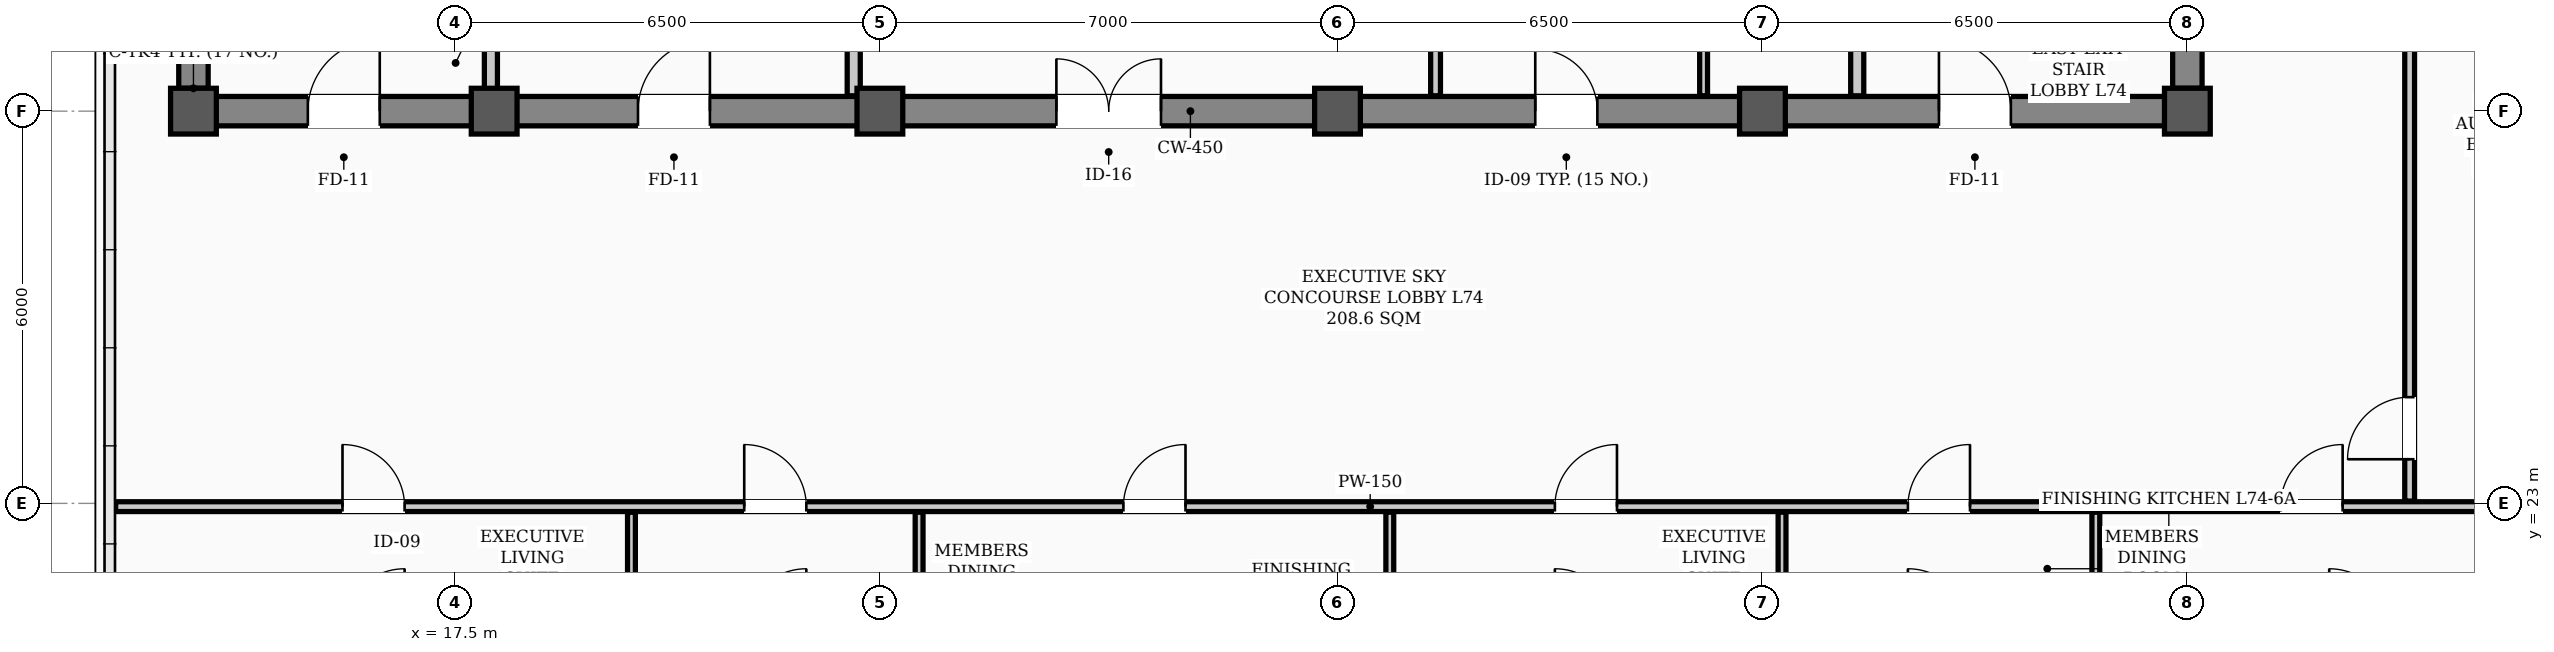
"""IFC4 building model, lengths in metres.
Left out: names, types, materials, properties, quantities, classifications, styles, units other than length and angle.
Written with IfcOpenShell. Run it as: python <this file> out.ifc"""

import sys

from ifc_helpers import new_model, si_unit, direction, frame, frame_2d, origin, origin_2d, place, context, subcontext, project, spatial, rectangle, hollow_rectangle, extrude, element, fill, save


model = new_model("IFC4")
c1 = context("Model", 3, precision=1e-05, world=origin(), true_north=direction((0.0, 1.0)))
c2 = subcontext(c1, "Body", "Model", "MODEL_VIEW")
j1 = project(units=[si_unit("LENGTHUNIT", "METRE"), si_unit("PLANEANGLEUNIT", "RADIAN")], contexts=[c1])
p1 = place(None, origin())
s1 = spatial("IfcSite", under=j1, at=p1, CompositionType="ELEMENT")
p2 = place(p1, origin())
s2 = spatial("IfcBuilding", under=s1, at=p2, CompositionType="ELEMENT")
p3 = place(p2, frame((0.0, 0.0, 296.9)))
s3 = spatial("IfcBuildingStorey", under=s2, at=p3, CompositionType="ELEMENT", Elevation=296.9)
for number, where, z_axis, x_axis in (
    (1, (13.5, 29.0, 0.0), (0.0, 0.0, 1.0), (1.0, 0.0, 0.0)),
    (2, (18.1, 29.0, 0.0), (0.0, 0.0, 1.0), (1.0, 0.0, 0.0)),
    (3, (24.0, 29.0, 0.0), (0.0, 0.0, 1.0), (1.0, 0.0, 0.0)),
    (4, (31.0, 29.0, 0.0), (0.0, 0.0, 1.0), (1.0, 0.0, 0.0)),
    (5, (37.5, 29.0, 0.0), (0.0, 0.0, 1.0), (1.0, 0.0, 0.0)),
    (6, (44.0, 29.0, 0.0), (0.0, 0.0, 1.0), (1.0, 0.0, 0.0)),
):
    element("IfcColumn", number, at=place(p3, frame(where, z_axis=z_axis, x_axis=x_axis)), inside=s3, PredefinedType="COLUMN", context=c2, shape_type="SweptSolid", body=[
        extrude(hollow_rectangle(XDim=0.7, YDim=0.7, WallThickness=0.028, InnerFilletRadius=0.014, OuterFilletRadius=0.042, at=origin_2d()), origin(), (0.0, 0.0, 1.0), 3.9),
    ])
p4 = place(p3, frame((13.5, 29.0, 0.0), z_axis=(0.0, 0.0, 1.0), x_axis=(1.0, 0.0, 0.0)))
e7 = element("IfcWall", 7, at=p4, inside=s3, PredefinedType="SHEAR", context=c2, shape_type="SweptSolid", body=[
    extrude(rectangle(XDim=30.5, YDim=0.45, at=frame_2d((15.25, 0.0))), origin(), (0.0, 0.0, 1.0), 3.72),
])
p5 = place(p4, frame((1.75, 0.0, 0.0)))
e8 = element("IfcOpeningElement", 8, at=p5, cuts=e7, PredefinedType="OPENING", context=c2, shape_type="SweptSolid", body=[
    extrude(rectangle(XDim=1.1, YDim=2.08, at=frame_2d((0.55, 1.04))), frame((0.0, 0.235, 0.0), z_axis=(0.0, -1.0, 0.0), x_axis=(1.0, 0.0, 0.0)), (0.0, 0.0, 1.0), 0.47),
])
p6 = place(p4, frame((26.7, 0.0, 0.0)))
e9 = element("IfcOpeningElement", 9, at=p6, cuts=e7, PredefinedType="OPENING", context=c2, shape_type="SweptSolid", body=[
    extrude(rectangle(XDim=1.1, YDim=2.08, at=frame_2d((0.55, 1.04))), frame((0.0, 0.235, 0.0), z_axis=(0.0, -1.0, 0.0), x_axis=(1.0, 0.0, 0.0)), (0.0, 0.0, 1.0), 0.47),
])
p7 = place(p4, frame((6.8, 0.0, 0.0)))
e10 = element("IfcOpeningElement", 10, at=p7, cuts=e7, PredefinedType="OPENING", context=c2, shape_type="SweptSolid", body=[
    extrude(rectangle(XDim=1.1, YDim=2.08, at=frame_2d((0.55, 1.04))), frame((0.0, 0.235, 0.0), z_axis=(0.0, -1.0, 0.0), x_axis=(1.0, 0.0, 0.0)), (0.0, 0.0, 1.0), 0.47),
])
p8 = place(p4, frame((13.2, 0.0, 0.0)))
e11 = element("IfcOpeningElement", 11, at=p8, cuts=e7, PredefinedType="OPENING", context=c2, shape_type="SweptSolid", body=[
    extrude(rectangle(XDim=1.6, YDim=2.08, at=frame_2d((0.8, 1.04))), frame((0.0, 0.235, 0.0), z_axis=(0.0, -1.0, 0.0), x_axis=(1.0, 0.0, 0.0)), (0.0, 0.0, 1.0), 0.47),
])
p9 = place(p4, frame((20.525, 0.0, 0.0)))
e12 = element("IfcOpeningElement", 12, at=p9, cuts=e7, PredefinedType="OPENING", context=c2, shape_type="SweptSolid", body=[
    extrude(rectangle(XDim=0.95, YDim=2.08, at=frame_2d((0.475, 1.04))), frame((0.0, 0.235, 0.0), z_axis=(0.0, -1.0, 0.0), x_axis=(1.0, 0.0, 0.0)), (0.0, 0.0, 1.0), 0.47),
])
for number, where, z_axis, x_axis in (
    (13, (13.5, 29.35, 0.0), (0.0, 0.0, 1.0), (0.0, 1.0, 0.0)),
    (14, (44.0, 29.35, 0.0), (0.0, 0.0, 1.0), (0.0, 1.0, 0.0)),
):
    element("IfcWall", number, at=place(p3, frame(where, z_axis=z_axis, x_axis=x_axis)), inside=s3, PredefinedType="SHEAR", context=c2, shape_type="SweptSolid", body=[
        extrude(rectangle(XDim=8.6, YDim=0.45, at=frame_2d((4.3, 0.0))), origin(), (0.0, 0.0, 1.0), 3.72),
    ])
p10 = place(p3, frame((12.31, 22.95, 0.0), z_axis=(0.0, 0.0, 1.0), x_axis=(1.0, 0.0, 0.0)))
e15 = element("IfcWall", 15, at=p10, inside=s3, PredefinedType="PARTITIONING", context=c2, shape_type="SweptSolid", body=[
    extrude(rectangle(XDim=38.38, YDim=0.15, at=frame_2d((19.19, 0.0))), origin(), (0.0, 0.0, 1.0), 3.2),
])
p11 = place(p10, frame((3.47, 0.0, 0.0)))
e16 = element("IfcOpeningElement", 16, at=p11, cuts=e15, PredefinedType="OPENING", context=c2, shape_type="SweptSolid", body=[
    extrude(rectangle(XDim=0.95, YDim=2.08, at=frame_2d((0.475, 1.04))), frame((0.0, 0.085, 0.0), z_axis=(0.0, -1.0, 0.0), x_axis=(1.0, 0.0, 0.0)), (0.0, 0.0, 1.0), 0.17),
])
p12 = place(p10, frame((9.615, 0.0, 0.0)))
e17 = element("IfcOpeningElement", 17, at=p12, cuts=e15, PredefinedType="OPENING", context=c2, shape_type="SweptSolid", body=[
    extrude(rectangle(XDim=0.95, YDim=2.08, at=frame_2d((0.475, 1.04))), frame((0.0, 0.085, 0.0), z_axis=(0.0, -1.0, 0.0), x_axis=(1.0, 0.0, 0.0)), (0.0, 0.0, 1.0), 0.17),
])
p13 = place(p10, frame((15.415, 0.0, 0.0)))
e18 = element("IfcOpeningElement", 18, at=p13, cuts=e15, PredefinedType="OPENING", context=c2, shape_type="SweptSolid", body=[
    extrude(rectangle(XDim=0.95, YDim=2.08, at=frame_2d((0.475, 1.04))), frame((0.0, 0.085, 0.0), z_axis=(0.0, -1.0, 0.0), x_axis=(1.0, 0.0, 0.0)), (0.0, 0.0, 1.0), 0.17),
])
p14 = place(p10, frame((22.015, 0.0, 0.0)))
e19 = element("IfcOpeningElement", 19, at=p14, cuts=e15, PredefinedType="OPENING", context=c2, shape_type="SweptSolid", body=[
    extrude(rectangle(XDim=0.95, YDim=2.08, at=frame_2d((0.475, 1.04))), frame((0.0, 0.085, 0.0), z_axis=(0.0, -1.0, 0.0), x_axis=(1.0, 0.0, 0.0)), (0.0, 0.0, 1.0), 0.17),
])
p15 = place(p10, frame((27.415, 0.0, 0.0)))
e20 = element("IfcOpeningElement", 20, at=p15, cuts=e15, PredefinedType="OPENING", context=c2, shape_type="SweptSolid", body=[
    extrude(rectangle(XDim=0.95, YDim=2.08, at=frame_2d((0.475, 1.04))), frame((0.0, 0.085, 0.0), z_axis=(0.0, -1.0, 0.0), x_axis=(1.0, 0.0, 0.0)), (0.0, 0.0, 1.0), 0.17),
])
p16 = place(p10, frame((33.115, 0.0, 0.0)))
e21 = element("IfcOpeningElement", 21, at=p16, cuts=e15, PredefinedType="OPENING", context=c2, shape_type="SweptSolid", body=[
    extrude(rectangle(XDim=0.95, YDim=2.08, at=frame_2d((0.475, 1.04))), frame((0.0, 0.085, 0.0), z_axis=(0.0, -1.0, 0.0), x_axis=(1.0, 0.0, 0.0)), (0.0, 0.0, 1.0), 0.17),
])
p17 = place(p3, frame((18.05, 29.235, 0.0), z_axis=(0.0, 0.0, 1.0), x_axis=(0.0, 1.0, 0.0)))
e22 = element("IfcWall", 22, at=p17, inside=s3, PredefinedType="STANDARD", context=c2, shape_type="SweptSolid", body=[
    extrude(rectangle(XDim=1.065, YDim=0.2, at=frame_2d((0.532, 0.0))), origin(), (0.0, 0.0, 1.0), 3.72),
])
p18 = place(p3, frame((38.95, 29.235, 0.0), z_axis=(0.0, 0.0, 1.0), x_axis=(0.0, 1.0, 0.0)))
e23 = element("IfcWall", 23, at=p18, inside=s3, PredefinedType="STANDARD", context=c2, shape_type="SweptSolid", body=[
    extrude(rectangle(XDim=1.065, YDim=0.2, at=frame_2d((0.532, 0.0))), origin(), (0.0, 0.0, 1.0), 3.4),
])
p19 = place(p3, frame((23.6, 29.235, 0.0), z_axis=(0.0, 0.0, 1.0), x_axis=(0.0, 1.0, 0.0)))
e24 = element("IfcWall", 24, at=p19, inside=s3, PredefinedType="STANDARD", context=c2, shape_type="SweptSolid", body=[
    extrude(rectangle(XDim=5.465, YDim=0.2, at=frame_2d((2.732, 0.0))), origin(), (0.0, 0.0, 1.0), 3.2),
])
p20 = place(p3, frame((32.5, 29.235, 0.0), z_axis=(0.0, 0.0, 1.0), x_axis=(0.0, 1.0, 0.0)))
e25 = element("IfcWall", 25, at=p20, inside=s3, PredefinedType="PARTITIONING", context=c2, shape_type="SweptSolid", body=[
    extrude(rectangle(XDim=2.53, YDim=0.15, at=frame_2d((1.265, 0.0))), origin(), (0.0, 0.0, 1.0), 3.4),
])
p21 = place(p3, frame((36.6, 29.235, 0.0), z_axis=(0.0, 0.0, 1.0), x_axis=(0.0, 1.0, 0.0)))
e26 = element("IfcWall", 26, at=p21, inside=s3, PredefinedType="PARTITIONING", context=c2, shape_type="SweptSolid", body=[
    extrude(rectangle(XDim=2.53, YDim=0.12, at=frame_2d((1.265, 0.0))), origin(), (0.0, 0.0, 1.0), 3.4),
])
p22 = place(p3, frame((47.4, 23.035, 0.0), z_axis=(0.0, 0.0, 1.0), x_axis=(0.0, 1.0, 0.0)))
e27 = element("IfcWall", 27, at=p22, inside=s3, PredefinedType="PARTITIONING", context=c2, shape_type="SweptSolid", body=[
    extrude(rectangle(XDim=18.63, YDim=0.15, at=frame_2d((9.315, 0.0))), origin(), (0.0, 0.0, 1.0), 3.1),
])
p23 = place(p22, frame((0.64, 0.0, 0.0)))
e28 = element("IfcOpeningElement", 28, at=p23, cuts=e27, PredefinedType="OPENING", context=c2, shape_type="SweptSolid", body=[
    extrude(rectangle(XDim=0.95, YDim=2.08, at=frame_2d((0.475, 1.04))), frame((0.0, 0.085, 0.0), z_axis=(0.0, -1.0, 0.0), x_axis=(1.0, 0.0, 0.0)), (0.0, 0.0, 1.0), 0.17),
])
p24 = place(p22, frame((10.59, 0.0, 0.0)))
e29 = element("IfcOpeningElement", 29, at=p24, cuts=e27, PredefinedType="OPENING", context=c2, shape_type="SweptSolid", body=[
    extrude(rectangle(XDim=0.95, YDim=2.08, at=frame_2d((0.475, 1.04))), frame((0.0, 0.085, 0.0), z_axis=(0.0, -1.0, 0.0), x_axis=(1.0, 0.0, 0.0)), (0.0, 0.0, 1.0), 0.17),
])
p25 = place(p22, frame((15.365, 0.0, 0.0)))
e30 = element("IfcOpeningElement", 30, at=p25, cuts=e27, PredefinedType="OPENING", context=c2, shape_type="SweptSolid", body=[
    extrude(rectangle(XDim=0.95, YDim=2.08, at=frame_2d((0.475, 1.04))), frame((0.0, 0.085, 0.0), z_axis=(0.0, -1.0, 0.0), x_axis=(1.0, 0.0, 0.0)), (0.0, 0.0, 1.0), 0.17),
])
p26 = place(p3, frame((20.2, 18.71, 0.0), z_axis=(0.0, 0.0, 1.0), x_axis=(0.0, 1.0, 0.0)))
e31 = element("IfcWall", 31, at=p26, inside=s3, PredefinedType="PARTITIONING", context=c2, shape_type="SweptSolid", body=[
    extrude(rectangle(XDim=4.155, YDim=0.12, at=frame_2d((2.078, 0.0))), origin(), (0.0, 0.0, 1.0), 3.72),
])
p27 = place(p3, frame((24.6, 20.47, 0.0), z_axis=(0.0, 0.0, 1.0), x_axis=(0.0, 1.0, 0.0)))
e32 = element("IfcWall", 32, at=p27, inside=s3, PredefinedType="PARTITIONING", context=c2, shape_type="SweptSolid", body=[
    extrude(rectangle(XDim=2.395, YDim=0.12, at=frame_2d((1.198, 0.0))), origin(), (0.0, 0.0, 1.0), 3.1),
])
for number, where, z_axis, x_axis in (
    (33, (31.8, 18.71, 0.0), (0.0, 0.0, 1.0), (0.0, 1.0, 0.0)),
    (34, (37.8, 18.71, 0.0), (0.0, 0.0, 1.0), (0.0, 1.0, 0.0)),
    (35, (42.6, 18.71, 0.0), (0.0, 0.0, 1.0), (0.0, 1.0, 0.0)),
):
    element("IfcWall", number, at=place(p3, frame(where, z_axis=z_axis, x_axis=x_axis)), inside=s3, PredefinedType="PARTITIONING", context=c2, shape_type="SweptSolid", body=[
        extrude(rectangle(XDim=4.155, YDim=0.12, at=frame_2d((2.078, 0.0))), origin(), (0.0, 0.0, 1.0), 3.1),
    ])
p28 = place(p5, origin())
e36 = element("IfcDoor", 36, at=p28, inside=s3, OperationType="SINGLE_SWING_RIGHT", PredefinedType="DOOR", context=c2, shape_type="SweptSolid", body=[
    extrude(rectangle(XDim=1.1, YDim=2.08, at=frame_2d((0.55, 1.04))), frame((0.0, 0.025, 0.0), z_axis=(0.0, -1.0, 0.0), x_axis=(1.0, 0.0, 0.0)), (0.0, 0.0, 1.0), 0.05),
])
fill(e8, e36)
p29 = place(p6, origin())
e37 = element("IfcDoor", 37, at=p29, inside=s3, OperationType="SINGLE_SWING_LEFT", PredefinedType="DOOR", context=c2, shape_type="SweptSolid", body=[
    extrude(rectangle(XDim=1.1, YDim=2.08, at=frame_2d((0.55, 1.04))), frame((0.0, 0.025, 0.0), z_axis=(0.0, -1.0, 0.0), x_axis=(1.0, 0.0, 0.0)), (0.0, 0.0, 1.0), 0.05),
])
fill(e9, e37)
p30 = place(p7, origin())
e38 = element("IfcDoor", 38, at=p30, inside=s3, OperationType="SINGLE_SWING_RIGHT", PredefinedType="DOOR", context=c2, shape_type="SweptSolid", body=[
    extrude(rectangle(XDim=1.1, YDim=2.08, at=frame_2d((0.55, 1.04))), frame((0.0, 0.025, 0.0), z_axis=(0.0, -1.0, 0.0), x_axis=(1.0, 0.0, 0.0)), (0.0, 0.0, 1.0), 0.05),
])
fill(e10, e38)
p31 = place(p8, origin())
e39 = element("IfcDoor", 39, at=p31, inside=s3, OperationType="DOUBLE_DOOR_SINGLE_SWING", PredefinedType="DOOR", context=c2, shape_type="SweptSolid", body=[
    extrude(rectangle(XDim=1.6, YDim=2.08, at=frame_2d((0.8, 1.04))), frame((0.0, 0.025, 0.0), z_axis=(0.0, -1.0, 0.0), x_axis=(1.0, 0.0, 0.0)), (0.0, 0.0, 1.0), 0.05),
])
fill(e11, e39)
p32 = place(p9, origin())
e40 = element("IfcDoor", 40, at=p32, inside=s3, OperationType="SINGLE_SWING_LEFT", PredefinedType="DOOR", context=c2, shape_type="SweptSolid", body=[
    extrude(rectangle(XDim=0.95, YDim=2.08, at=frame_2d((0.475, 1.04))), frame((0.0, 0.025, 0.0), z_axis=(0.0, -1.0, 0.0), x_axis=(1.0, 0.0, 0.0)), (0.0, 0.0, 1.0), 0.05),
])
fill(e12, e40)
p33 = place(p11, origin())
e41 = element("IfcDoor", 41, at=p33, inside=s3, OperationType="SINGLE_SWING_LEFT", PredefinedType="DOOR", context=c2, shape_type="SweptSolid", body=[
    extrude(rectangle(XDim=0.95, YDim=2.08, at=frame_2d((0.475, 1.04))), frame((0.0, 0.025, 0.0), z_axis=(0.0, -1.0, 0.0), x_axis=(1.0, 0.0, 0.0)), (0.0, 0.0, 1.0), 0.05),
])
fill(e16, e41)
p34 = place(p12, origin())
e42 = element("IfcDoor", 42, at=p34, inside=s3, OperationType="SINGLE_SWING_LEFT", PredefinedType="DOOR", context=c2, shape_type="SweptSolid", body=[
    extrude(rectangle(XDim=0.95, YDim=2.08, at=frame_2d((0.475, 1.04))), frame((0.0, 0.025, 0.0), z_axis=(0.0, -1.0, 0.0), x_axis=(1.0, 0.0, 0.0)), (0.0, 0.0, 1.0), 0.05),
])
fill(e17, e42)
p35 = place(p13, origin())
e43 = element("IfcDoor", 43, at=p35, inside=s3, OperationType="SINGLE_SWING_RIGHT", PredefinedType="DOOR", context=c2, shape_type="SweptSolid", body=[
    extrude(rectangle(XDim=0.95, YDim=2.08, at=frame_2d((0.475, 1.04))), frame((0.0, 0.025, 0.0), z_axis=(0.0, -1.0, 0.0), x_axis=(1.0, 0.0, 0.0)), (0.0, 0.0, 1.0), 0.05),
])
fill(e18, e43)
p36 = place(p14, origin())
e44 = element("IfcDoor", 44, at=p36, inside=s3, OperationType="SINGLE_SWING_RIGHT", PredefinedType="DOOR", context=c2, shape_type="SweptSolid", body=[
    extrude(rectangle(XDim=0.95, YDim=2.08, at=frame_2d((0.475, 1.04))), frame((0.0, 0.025, 0.0), z_axis=(0.0, -1.0, 0.0), x_axis=(1.0, 0.0, 0.0)), (0.0, 0.0, 1.0), 0.05),
])
fill(e19, e44)
p37 = place(p15, origin())
e45 = element("IfcDoor", 45, at=p37, inside=s3, OperationType="SINGLE_SWING_RIGHT", PredefinedType="DOOR", context=c2, shape_type="SweptSolid", body=[
    extrude(rectangle(XDim=0.95, YDim=2.08, at=frame_2d((0.475, 1.04))), frame((0.0, 0.025, 0.0), z_axis=(0.0, -1.0, 0.0), x_axis=(1.0, 0.0, 0.0)), (0.0, 0.0, 1.0), 0.05),
])
fill(e20, e45)
p38 = place(p16, origin())
e46 = element("IfcDoor", 46, at=p38, inside=s3, OperationType="SINGLE_SWING_RIGHT", PredefinedType="DOOR", context=c2, shape_type="SweptSolid", body=[
    extrude(rectangle(XDim=0.95, YDim=2.08, at=frame_2d((0.475, 1.04))), frame((0.0, 0.025, 0.0), z_axis=(0.0, -1.0, 0.0), x_axis=(1.0, 0.0, 0.0)), (0.0, 0.0, 1.0), 0.05),
])
fill(e21, e46)
p39 = place(p23, origin())
e47 = element("IfcDoor", 47, at=p39, inside=s3, OperationType="SINGLE_SWING_LEFT", PredefinedType="DOOR", context=c2, shape_type="SweptSolid", body=[
    extrude(rectangle(XDim=0.95, YDim=2.08, at=frame_2d((0.475, 1.04))), frame((0.0, 0.025, 0.0), z_axis=(0.0, -1.0, 0.0), x_axis=(1.0, 0.0, 0.0)), (0.0, 0.0, 1.0), 0.05),
])
fill(e28, e47)
save(model, sys.argv[1])
